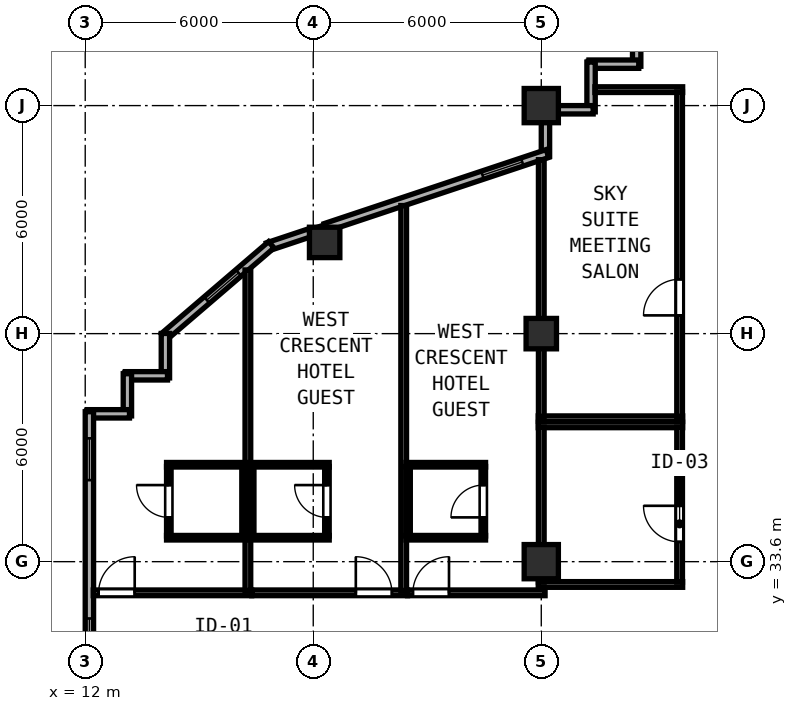
"""IFC4 building model, lengths in metres.
Left out: names, types, materials, properties, quantities, classifications, styles, units other than length and angle.
Written with IfcOpenShell. Run it as: python <this file> out.ifc"""

import sys

from ifc_helpers import new_model, si_unit, direction, frame, frame_2d, origin, origin_2d, place, context, subcontext, project, spatial, rectangle, hollow_rectangle, extrude, element, fill, save


model = new_model("IFC4")
c1 = context("Model", 3, precision=1e-05, world=origin(), true_north=direction((0.0, 1.0)))
c2 = subcontext(c1, "Body", "Model", "MODEL_VIEW")
j1 = project(units=[si_unit("LENGTHUNIT", "METRE"), si_unit("PLANEANGLEUNIT", "RADIAN")], contexts=[c1])
p1 = place(None, origin())
s1 = spatial("IfcSite", under=j1, at=p1, CompositionType="ELEMENT")
p2 = place(p1, origin())
s2 = spatial("IfcBuilding", under=s1, at=p2, CompositionType="ELEMENT")
p3 = place(p2, frame((0.0, 0.0, 223.0)))
s3 = spatial("IfcBuildingStorey", under=s2, at=p3, CompositionType="ELEMENT", Elevation=223.0)
for number, where, z_axis, x_axis in (
    (1, (24.0, 33.6, 0.0), (0.0, 0.0, 1.0), (1.0, 0.0, 0.0)),
    (2, (24.0, 45.6, 0.0), (0.0, 0.0, 1.0), (1.0, 0.0, 0.0)),
):
    element("IfcColumn", number, at=place(p3, frame(where, z_axis=z_axis, x_axis=x_axis)), inside=s3, PredefinedType="COLUMN", context=c2, shape_type="SweptSolid", body=[
        extrude(hollow_rectangle(XDim=0.9, YDim=0.9, WallThickness=0.034, at=origin_2d()), origin(), (0.0, 0.0, 1.0), 3.8),
    ])
for number, where, z_axis, x_axis in (
    (3, (24.0, 39.6, 0.0), (0.0, 0.0, 1.0), (1.0, 0.0, 0.0)),
    (4, (18.3, 42.0, 0.0), (0.0, 0.0, 1.0), (1.0, 0.0, 0.0)),
):
    element("IfcColumn", number, at=place(p3, frame(where, z_axis=z_axis, x_axis=x_axis)), inside=s3, PredefinedType="COLUMN", context=c2, shape_type="SweptSolid", body=[
        extrude(hollow_rectangle(XDim=0.8, YDim=0.8, WallThickness=0.03, at=origin_2d()), origin(), (0.0, 0.0, 1.0), 3.8),
    ])
p4 = place(p3, frame((26.51, 48.0, 0.0), z_axis=(0.0, 0.0, 1.0), x_axis=(0.0, -1.0, 0.0)))
e5 = element("IfcWall", 5, at=p4, inside=s3, PredefinedType="SOLIDWALL", context=c2, shape_type="SweptSolid", body=[
    extrude(rectangle(XDim=1.365, YDim=0.22, at=frame_2d((0.683, 0.0))), origin(), (0.0, 0.0, 1.0), 3.62),
])
for number, where, z_axis, x_axis in (
    (6, (26.565, 46.69, 0.0), (0.0, 0.0, 1.0), (-1.0, 0.0, 0.0)),
    (7, (25.31, 46.745, 0.0), (0.0, 0.0, 1.0), (0.0, -1.0, 0.0)),
):
    element("IfcWall", number, at=place(p3, frame(where, z_axis=z_axis, x_axis=x_axis)), inside=s3, PredefinedType="SOLIDWALL", context=c2, shape_type="SweptSolid", body=[
        extrude(rectangle(XDim=1.31, YDim=0.22, at=frame_2d((0.655, 0.0))), origin(), (0.0, 0.0, 1.0), 3.62),
    ])
p5 = place(p3, frame((25.365, 45.49, 0.0), z_axis=(0.0, 0.0, 1.0), x_axis=(-1.0, 0.0, 0.0)))
e8 = element("IfcWall", 8, at=p5, inside=s3, PredefinedType="SOLIDWALL", context=c2, shape_type="SweptSolid", body=[
    extrude(rectangle(XDim=0.923, YDim=0.22, at=frame_2d((0.461, 0.0))), origin(), (0.0, 0.0, 1.0), 3.62),
])
p6 = place(p3, frame((24.11, 45.158, 0.0), z_axis=(0.0, 0.0, 1.0), x_axis=(0.0, -1.0, 0.0)))
e9 = element("IfcWall", 9, at=p6, inside=s3, PredefinedType="SOLIDWALL", context=c2, shape_type="SweptSolid", body=[
    extrude(rectangle(XDim=0.892, YDim=0.22, at=frame_2d((0.446, 0.0))), origin(), (0.0, 0.0, 1.0), 3.215),
])
p7 = place(p3, frame((24.162, 44.338, 0.0), z_axis=(0.0, 0.0, 1.0), x_axis=(-0.948687265055, -0.316215864755, 0.0)))
e10 = element("IfcWall", 10, at=p7, inside=s3, PredefinedType="SOLIDWALL", context=c2, shape_type="SweptSolid", body=[
    extrude(rectangle(XDim=6.154, YDim=0.22, at=frame_2d((3.077, 0.0))), origin(), (0.0, 0.0, 1.0), 3.215),
])
p8 = place(p7, frame((0.7, 0.0, 0.85)))
e11 = element("IfcOpeningElement", 11, at=p8, cuts=e10, PredefinedType="OPENING", context=c2, shape_type="SweptSolid", body=[
    extrude(rectangle(XDim=1.1, YDim=1.75, at=frame_2d((0.55, 0.875))), frame((0.0, 0.12, 0.0), z_axis=(0.0, -1.0, 0.0), x_axis=(1.0, 0.0, 0.0)), (0.0, 0.0, 1.0), 0.24),
])
p9 = place(p3, frame((17.908, 42.253, 0.0), z_axis=(0.0, 0.0, 1.0), x_axis=(-0.948662335685, -0.316290646166, 0.0)))
e12 = element("IfcWall", 12, at=p9, inside=s3, PredefinedType="SOLIDWALL", context=c2, shape_type="SweptSolid", body=[
    extrude(rectangle(XDim=1.165, YDim=0.22, at=frame_2d((0.583, 0.0))), origin(), (0.0, 0.0, 1.0), 3.62),
])
p10 = place(p3, frame((16.897, 41.938, 0.0), z_axis=(0.0, 0.0, 1.0), x_axis=(-0.759279729622, -0.650764390686, 0.0)))
e13 = element("IfcWall", 13, at=p10, inside=s3, PredefinedType="SOLIDWALL", context=c2, shape_type="SweptSolid", body=[
    extrude(rectangle(XDim=3.726, YDim=0.22, at=frame_2d((1.863, 0.0))), origin(), (0.0, 0.0, 1.0), 3.62),
])
p11 = place(p10, frame((1.135, 0.0, 0.85)))
e14 = element("IfcOpeningElement", 14, at=p11, cuts=e13, PredefinedType="OPENING", context=c2, shape_type="SweptSolid", body=[
    extrude(rectangle(XDim=1.1, YDim=1.75, at=frame_2d((0.55, 0.875))), frame((0.0, 0.12, 0.0), z_axis=(0.0, -1.0, 0.0), x_axis=(1.0, 0.0, 0.0)), (0.0, 0.0, 1.0), 0.24),
])
p12 = place(p3, frame((14.11, 39.604, 0.0), z_axis=(0.0, 0.0, 1.0), x_axis=(0.0, -1.0, 0.0)))
e15 = element("IfcWall", 15, at=p12, inside=s3, PredefinedType="SOLIDWALL", context=c2, shape_type="SweptSolid", body=[
    extrude(rectangle(XDim=1.169, YDim=0.22, at=frame_2d((0.585, 0.0))), origin(), (0.0, 0.0, 1.0), 3.62),
])
p13 = place(p3, frame((14.165, 38.49, 0.0), z_axis=(0.0, 0.0, 1.0), x_axis=(-1.0, 0.0, 0.0)))
e16 = element("IfcWall", 16, at=p13, inside=s3, PredefinedType="SOLIDWALL", context=c2, shape_type="SweptSolid", body=[
    extrude(rectangle(XDim=1.11, YDim=0.22, at=frame_2d((0.555, 0.0))), origin(), (0.0, 0.0, 1.0), 3.62),
])
p14 = place(p3, frame((13.11, 38.545, 0.0), z_axis=(0.0, 0.0, 1.0), x_axis=(0.0, -1.0, 0.0)))
e17 = element("IfcWall", 17, at=p14, inside=s3, PredefinedType="SOLIDWALL", context=c2, shape_type="SweptSolid", body=[
    extrude(rectangle(XDim=1.11, YDim=0.22, at=frame_2d((0.555, 0.0))), origin(), (0.0, 0.0, 1.0), 3.62),
])
p15 = place(p3, frame((13.165, 37.49, 0.0), z_axis=(0.0, 0.0, 1.0), x_axis=(-1.0, 0.0, 0.0)))
e18 = element("IfcWall", 18, at=p15, inside=s3, PredefinedType="SOLIDWALL", context=c2, shape_type="SweptSolid", body=[
    extrude(rectangle(XDim=1.11, YDim=0.22, at=frame_2d((0.555, 0.0))), origin(), (0.0, 0.0, 1.0), 3.62),
])
p16 = place(p3, frame((12.11, 37.545, 0.0), z_axis=(0.0, 0.0, 1.0), x_axis=(0.0, -1.0, 0.0)))
e19 = element("IfcWall", 19, at=p16, inside=s3, PredefinedType="SOLIDWALL", context=c2, shape_type="SweptSolid", body=[
    extrude(rectangle(XDim=21.145, YDim=0.22, at=frame_2d((10.573, 0.0))), origin(), (0.0, 0.0, 1.0), 3.62),
])
p17 = place(p16, frame((0.7, 0.0, 0.85)))
e20 = element("IfcOpeningElement", 20, at=p17, cuts=e19, PredefinedType="OPENING", context=c2, shape_type="SweptSolid", body=[
    extrude(rectangle(XDim=1.1, YDim=1.75, at=frame_2d((0.55, 0.875))), frame((0.0, 0.12, 0.0), z_axis=(0.0, -1.0, 0.0), x_axis=(1.0, 0.0, 0.0)), (0.0, 0.0, 1.0), 0.24),
])
p18 = place(p16, frame((5.44, 0.0, 0.85)))
e21 = element("IfcOpeningElement", 21, at=p18, cuts=e19, PredefinedType="OPENING", context=c2, shape_type="SweptSolid", body=[
    extrude(rectangle(XDim=1.1, YDim=1.75, at=frame_2d((0.55, 0.875))), frame((0.0, 0.12, 0.0), z_axis=(0.0, -1.0, 0.0), x_axis=(1.0, 0.0, 0.0)), (0.0, 0.0, 1.0), 0.24),
])
p19 = place(p16, frame((11.5, 0.0, 0.85)))
e22 = element("IfcOpeningElement", 22, at=p19, cuts=e19, PredefinedType="OPENING", context=c2, shape_type="SweptSolid", body=[
    extrude(rectangle(XDim=1.1, YDim=1.75, at=frame_2d((0.55, 0.875))), frame((0.0, 0.12, 0.0), z_axis=(0.0, -1.0, 0.0), x_axis=(1.0, 0.0, 0.0)), (0.0, 0.0, 1.0), 0.24),
])
p20 = place(p16, frame((16.9, 0.0, 0.85)))
e23 = element("IfcOpeningElement", 23, at=p20, cuts=e19, PredefinedType="OPENING", context=c2, shape_type="SweptSolid", body=[
    extrude(rectangle(XDim=1.1, YDim=1.75, at=frame_2d((0.55, 0.875))), frame((0.0, 0.12, 0.0), z_axis=(0.0, -1.0, 0.0), x_axis=(1.0, 0.0, 0.0)), (0.0, 0.0, 1.0), 0.24),
])
for number, where, z_axis, x_axis in (
    (24, (23.92, 37.2, 0.0), (0.0, 0.0, 1.0), (1.0, 0.0, 0.0)),
    (25, (23.92, 33.0, 0.0), (0.0, 0.0, 1.0), (1.0, 0.0, 0.0)),
):
    element("IfcWall", number, at=place(p3, frame(where, z_axis=z_axis, x_axis=x_axis)), inside=s3, PredefinedType="PARTITIONING", context=c2, shape_type="SweptSolid", body=[
        extrude(rectangle(XDim=3.8, YDim=0.15, at=frame_2d((1.9, 0.0))), origin(), (0.0, 0.0, 1.0), 3.62),
    ])
p21 = place(p3, frame((24.0, 33.06, 0.0), z_axis=(0.0, 0.0, 1.0), x_axis=(0.0, 1.0, 0.0)))
e26 = element("IfcWall", 26, at=p21, inside=s3, PredefinedType="PARTITIONING", context=c2, shape_type="SweptSolid", body=[
    extrude(rectangle(XDim=4.08, YDim=0.15, at=frame_2d((2.04, 0.0))), origin(), (0.0, 0.0, 1.0), 3.215),
])
p22 = place(p3, frame((27.64, 33.06, 0.0), z_axis=(0.0, 0.0, 1.0), x_axis=(0.0, 1.0, 0.0)))
e27 = element("IfcWall", 27, at=p22, inside=s3, PredefinedType="PARTITIONING", context=c2, shape_type="SweptSolid", body=[
    extrude(rectangle(XDim=4.08, YDim=0.15, at=frame_2d((2.04, 0.0))), origin(), (0.0, 0.0, 1.0), 3.62),
])
p23 = place(p22, frame((2.01, 0.0, 0.0), z_axis=(0.0, 0.0, 1.0), x_axis=(-1.0, 0.0, 0.0)))
e28 = element("IfcOpeningElement", 28, at=p23, cuts=e27, PredefinedType="OPENING", context=c2, shape_type="SweptSolid", body=[
    extrude(rectangle(XDim=0.95, YDim=2.12, at=frame_2d((0.475, 1.06))), frame((0.0, 0.085, 0.0), z_axis=(0.0, -1.0, 0.0), x_axis=(1.0, 0.0, 0.0)), (0.0, 0.0, 1.0), 0.17),
])
p24 = place(p3, frame((25.412, 46.02, 0.0), z_axis=(0.0, 0.0, 1.0), x_axis=(1.0, 0.0, 0.0)))
e29 = element("IfcWall", 29, at=p24, inside=s3, PredefinedType="PARTITIONING", context=c2, shape_type="SweptSolid", body=[
    extrude(rectangle(XDim=2.308, YDim=0.15, at=frame_2d((1.154, 0.0))), origin(), (0.0, 0.0, 1.0), 3.62),
])
p25 = place(p3, frame((23.92, 37.36, 0.0), z_axis=(0.0, 0.0, 1.0), x_axis=(1.0, 0.0, 0.0)))
e30 = element("IfcWall", 30, at=p25, inside=s3, PredefinedType="PARTITIONING", context=c2, shape_type="SweptSolid", body=[
    extrude(rectangle(XDim=3.8, YDim=0.15, at=frame_2d((1.9, 0.0))), origin(), (0.0, 0.0, 1.0), 3.62),
])
p26 = place(p3, frame((24.0, 37.42, 0.0), z_axis=(0.0, 0.0, 1.0), x_axis=(0.0, 1.0, 0.0)))
e31 = element("IfcWall", 31, at=p26, inside=s3, PredefinedType="PARTITIONING", context=c2, shape_type="SweptSolid", body=[
    extrude(rectangle(XDim=6.757, YDim=0.15, at=frame_2d((3.378, 0.0))), origin(), (0.0, 0.0, 1.0), 3.215),
])
p27 = place(p3, frame((27.64, 37.42, 0.0), z_axis=(0.0, 0.0, 1.0), x_axis=(0.0, 1.0, 0.0)))
e32 = element("IfcWall", 32, at=p27, inside=s3, PredefinedType="PARTITIONING", context=c2, shape_type="SweptSolid", body=[
    extrude(rectangle(XDim=8.54, YDim=0.15, at=frame_2d((4.27, 0.0))), origin(), (0.0, 0.0, 1.0), 3.62),
])
p28 = place(p27, frame((3.61, 0.0, 0.0), z_axis=(0.0, 0.0, 1.0), x_axis=(-1.0, 0.0, 0.0)))
e33 = element("IfcOpeningElement", 33, at=p28, cuts=e32, PredefinedType="OPENING", context=c2, shape_type="SweptSolid", body=[
    extrude(rectangle(XDim=0.95, YDim=2.12, at=frame_2d((0.475, 1.06))), frame((0.0, 0.085, 0.0), z_axis=(0.0, -1.0, 0.0), x_axis=(1.0, 0.0, 0.0)), (0.0, 0.0, 1.0), 0.17),
])
p29 = place(p3, frame((12.212, 32.78, 0.0), z_axis=(0.0, 0.0, 1.0), x_axis=(1.0, 0.0, 0.0)))
e34 = element("IfcWall", 34, at=p29, inside=s3, PredefinedType="PARTITIONING", context=c2, shape_type="SweptSolid", body=[
    extrude(rectangle(XDim=4.168, YDim=0.15, at=frame_2d((2.084, 0.0))), origin(), (0.0, 0.0, 1.0), 3.62),
])
p30 = place(p29, frame((0.14, 0.0, 0.0)))
e35 = element("IfcOpeningElement", 35, at=p30, cuts=e34, PredefinedType="OPENING", context=c2, shape_type="SweptSolid", body=[
    extrude(rectangle(XDim=0.95, YDim=2.15, at=frame_2d((0.475, 1.075))), frame((0.0, 0.085, 0.0), z_axis=(0.0, -1.0, 0.0), x_axis=(1.0, 0.0, 0.0)), (0.0, 0.0, 1.0), 0.17),
])
p31 = place(p3, frame((16.28, 32.84, 0.0), z_axis=(0.0, 0.0, 1.0), x_axis=(0.0, 1.0, 0.0)))
e36 = element("IfcWall", 36, at=p31, inside=s3, PredefinedType="PARTITIONING", context=c2, shape_type="SweptSolid", body=[
    extrude(rectangle(XDim=8.435, YDim=0.15, at=frame_2d((4.218, 0.0))), origin(), (0.0, 0.0, 1.0), 3.62),
])
for number, where, z_axis, x_axis in (
    (37, (14.14, 36.15, 0.0), (0.0, 0.0, 1.0), (1.0, 0.0, 0.0)),
    (38, (14.14, 34.23, 0.0), (0.0, 0.0, 1.0), (1.0, 0.0, 0.0)),
):
    element("IfcWall", number, at=place(p3, frame(where, z_axis=z_axis, x_axis=x_axis)), inside=s3, PredefinedType="PARTITIONING", context=c2, shape_type="SweptSolid", body=[
        extrude(rectangle(XDim=2.08, YDim=0.12, at=frame_2d((1.04, 0.0))), origin(), (0.0, 0.0, 1.0), 3.62),
    ])
p32 = place(p3, frame((14.2, 34.275, 0.0), z_axis=(0.0, 0.0, 1.0), x_axis=(0.0, 1.0, 0.0)))
e39 = element("IfcWall", 39, at=p32, inside=s3, PredefinedType="PARTITIONING", context=c2, shape_type="SweptSolid", body=[
    extrude(rectangle(XDim=1.83, YDim=0.12, at=frame_2d((0.915, 0.0))), origin(), (0.0, 0.0, 1.0), 3.62),
])
p33 = place(p32, frame((1.34, 0.0, 0.0), z_axis=(0.0, 0.0, 1.0), x_axis=(-1.0, 0.0, 0.0)))
e40 = element("IfcOpeningElement", 40, at=p33, cuts=e39, PredefinedType="OPENING", context=c2, shape_type="SweptSolid", body=[
    extrude(rectangle(XDim=0.85, YDim=2.1, at=frame_2d((0.425, 1.05))), frame((0.0, 0.07, 0.0), z_axis=(0.0, -1.0, 0.0), x_axis=(1.0, 0.0, 0.0)), (0.0, 0.0, 1.0), 0.14),
])
p34 = place(p3, frame((16.18, 34.275, 0.0), z_axis=(0.0, 0.0, 1.0), x_axis=(0.0, 1.0, 0.0)))
e41 = element("IfcWall", 41, at=p34, inside=s3, PredefinedType="PARTITIONING", context=c2, shape_type="SweptSolid", body=[
    extrude(rectangle(XDim=1.83, YDim=0.12, at=frame_2d((0.915, 0.0))), origin(), (0.0, 0.0, 1.0), 3.62),
])
p35 = place(p3, frame((16.382, 32.78, 0.0), z_axis=(0.0, 0.0, 1.0), x_axis=(1.0, 0.0, 0.0)))
e42 = element("IfcWall", 42, at=p35, inside=s3, PredefinedType="PARTITIONING", context=c2, shape_type="SweptSolid", body=[
    extrude(rectangle(XDim=4.098, YDim=0.15, at=frame_2d((2.049, 0.0))), origin(), (0.0, 0.0, 1.0), 3.62),
])
p36 = place(p35, frame((2.738, 0.0, 0.0)))
e43 = element("IfcOpeningElement", 43, at=p36, cuts=e42, PredefinedType="OPENING", context=c2, shape_type="SweptSolid", body=[
    extrude(rectangle(XDim=0.95, YDim=2.15, at=frame_2d((0.475, 1.075))), frame((0.0, 0.085, 0.0), z_axis=(0.0, -1.0, 0.0), x_axis=(1.0, 0.0, 0.0)), (0.0, 0.0, 1.0), 0.17),
])
p37 = place(p3, frame((20.38, 32.84, 0.0), z_axis=(0.0, 0.0, 1.0), x_axis=(0.0, 1.0, 0.0)))
e44 = element("IfcWall", 44, at=p37, inside=s3, PredefinedType="PARTITIONING", context=c2, shape_type="SweptSolid", body=[
    extrude(rectangle(XDim=10.13, YDim=0.15, at=frame_2d((5.065, 0.0))), origin(), (0.0, 0.0, 1.0), 3.62),
])
for number, where, z_axis, x_axis in (
    (45, (16.34, 36.15, 0.0), (0.0, 0.0, 1.0), (1.0, 0.0, 0.0)),
    (46, (16.34, 34.23, 0.0), (0.0, 0.0, 1.0), (1.0, 0.0, 0.0)),
):
    element("IfcWall", number, at=place(p3, frame(where, z_axis=z_axis, x_axis=x_axis)), inside=s3, PredefinedType="PARTITIONING", context=c2, shape_type="SweptSolid", body=[
        extrude(rectangle(XDim=2.08, YDim=0.12, at=frame_2d((1.04, 0.0))), origin(), (0.0, 0.0, 1.0), 3.62),
    ])
p38 = place(p3, frame((16.38, 34.275, 0.0), z_axis=(0.0, 0.0, 1.0), x_axis=(0.0, 1.0, 0.0)))
e47 = element("IfcWall", 47, at=p38, inside=s3, PredefinedType="PARTITIONING", context=c2, shape_type="SweptSolid", body=[
    extrude(rectangle(XDim=1.83, YDim=0.12, at=frame_2d((0.915, 0.0))), origin(), (0.0, 0.0, 1.0), 3.62),
])
p39 = place(p3, frame((18.36, 34.275, 0.0), z_axis=(0.0, 0.0, 1.0), x_axis=(0.0, 1.0, 0.0)))
e48 = element("IfcWall", 48, at=p39, inside=s3, PredefinedType="PARTITIONING", context=c2, shape_type="SweptSolid", body=[
    extrude(rectangle(XDim=1.83, YDim=0.12, at=frame_2d((0.915, 0.0))), origin(), (0.0, 0.0, 1.0), 3.62),
])
p40 = place(p39, frame((0.49, 0.0, 0.0)))
e49 = element("IfcOpeningElement", 49, at=p40, cuts=e48, PredefinedType="OPENING", context=c2, shape_type="SweptSolid", body=[
    extrude(rectangle(XDim=0.85, YDim=2.1, at=frame_2d((0.425, 1.05))), frame((0.0, 0.07, 0.0), z_axis=(0.0, -1.0, 0.0), x_axis=(1.0, 0.0, 0.0)), (0.0, 0.0, 1.0), 0.14),
])
p41 = place(p3, frame((20.482, 32.78, 0.0), z_axis=(0.0, 0.0, 1.0), x_axis=(1.0, 0.0, 0.0)))
e50 = element("IfcWall", 50, at=p41, inside=s3, PredefinedType="PARTITIONING", context=c2, shape_type="SweptSolid", body=[
    extrude(rectangle(XDim=3.618, YDim=0.15, at=frame_2d((1.809, 0.0))), origin(), (0.0, 0.0, 1.0), 3.62),
])
p42 = place(p41, frame((0.14, 0.0, 0.0)))
e51 = element("IfcOpeningElement", 51, at=p42, cuts=e50, PredefinedType="OPENING", context=c2, shape_type="SweptSolid", body=[
    extrude(rectangle(XDim=0.95, YDim=2.15, at=frame_2d((0.475, 1.075))), frame((0.0, 0.085, 0.0), z_axis=(0.0, -1.0, 0.0), x_axis=(1.0, 0.0, 0.0)), (0.0, 0.0, 1.0), 0.17),
])
for number, where, z_axis, x_axis in (
    (52, (20.44, 36.15, 0.0), (0.0, 0.0, 1.0), (1.0, 0.0, 0.0)),
    (53, (20.44, 34.23, 0.0), (0.0, 0.0, 1.0), (1.0, 0.0, 0.0)),
):
    element("IfcWall", number, at=place(p3, frame(where, z_axis=z_axis, x_axis=x_axis)), inside=s3, PredefinedType="PARTITIONING", context=c2, shape_type="SweptSolid", body=[
        extrude(rectangle(XDim=2.094, YDim=0.12, at=frame_2d((1.047, 0.0))), origin(), (0.0, 0.0, 1.0), 3.62),
    ])
p43 = place(p3, frame((20.494, 34.275, 0.0), z_axis=(0.0, 0.0, 1.0), x_axis=(0.0, 1.0, 0.0)))
e54 = element("IfcWall", 54, at=p43, inside=s3, PredefinedType="PARTITIONING", context=c2, shape_type="SweptSolid", body=[
    extrude(rectangle(XDim=1.83, YDim=0.12, at=frame_2d((0.915, 0.0))), origin(), (0.0, 0.0, 1.0), 3.62),
])
p44 = place(p3, frame((22.474, 34.275, 0.0), z_axis=(0.0, 0.0, 1.0), x_axis=(0.0, 1.0, 0.0)))
e55 = element("IfcWall", 55, at=p44, inside=s3, PredefinedType="PARTITIONING", context=c2, shape_type="SweptSolid", body=[
    extrude(rectangle(XDim=1.83, YDim=0.12, at=frame_2d((0.915, 0.0))), origin(), (0.0, 0.0, 1.0), 3.62),
])
p45 = place(p44, frame((0.49, 0.0, 0.0)))
e56 = element("IfcOpeningElement", 56, at=p45, cuts=e55, PredefinedType="OPENING", context=c2, shape_type="SweptSolid", body=[
    extrude(rectangle(XDim=0.85, YDim=2.1, at=frame_2d((0.425, 1.05))), frame((0.0, 0.07, 0.0), z_axis=(0.0, -1.0, 0.0), x_axis=(1.0, 0.0, 0.0)), (0.0, 0.0, 1.0), 0.14),
])
p46 = place(p8, origin())
e57 = element("IfcWindow", 57, at=p46, inside=s3, PartitioningType="SINGLE_PANEL", PredefinedType="WINDOW", context=c2, shape_type="SweptSolid", body=[
    extrude(rectangle(XDim=1.1, YDim=1.75, at=frame_2d((0.55, 0.875))), frame((0.0, 0.03, 0.0), z_axis=(0.0, -1.0, 0.0), x_axis=(1.0, 0.0, 0.0)), (0.0, 0.0, 1.0), 0.06),
])
fill(e11, e57)
p47 = place(p11, origin())
e58 = element("IfcWindow", 58, at=p47, inside=s3, PartitioningType="SINGLE_PANEL", PredefinedType="WINDOW", context=c2, shape_type="SweptSolid", body=[
    extrude(rectangle(XDim=1.1, YDim=1.75, at=frame_2d((0.55, 0.875))), frame((0.0, 0.03, 0.0), z_axis=(0.0, -1.0, 0.0), x_axis=(1.0, 0.0, 0.0)), (0.0, 0.0, 1.0), 0.06),
])
fill(e14, e58)
p48 = place(p17, origin())
e59 = element("IfcWindow", 59, at=p48, inside=s3, PartitioningType="SINGLE_PANEL", PredefinedType="WINDOW", context=c2, shape_type="SweptSolid", body=[
    extrude(rectangle(XDim=1.1, YDim=1.75, at=frame_2d((0.55, 0.875))), frame((0.0, 0.03, 0.0), z_axis=(0.0, -1.0, 0.0), x_axis=(1.0, 0.0, 0.0)), (0.0, 0.0, 1.0), 0.06),
])
fill(e20, e59)
p49 = place(p18, origin())
e60 = element("IfcWindow", 60, at=p49, inside=s3, PartitioningType="SINGLE_PANEL", PredefinedType="WINDOW", context=c2, shape_type="SweptSolid", body=[
    extrude(rectangle(XDim=1.1, YDim=1.75, at=frame_2d((0.55, 0.875))), frame((0.0, 0.03, 0.0), z_axis=(0.0, -1.0, 0.0), x_axis=(1.0, 0.0, 0.0)), (0.0, 0.0, 1.0), 0.06),
])
fill(e21, e60)
p50 = place(p23, origin())
e61 = element("IfcDoor", 61, at=p50, inside=s3, OperationType="SINGLE_SWING_LEFT", PredefinedType="DOOR", context=c2, shape_type="SweptSolid", body=[
    extrude(rectangle(XDim=0.95, YDim=2.12, at=frame_2d((0.475, 1.06))), frame((0.0, 0.025, 0.0), z_axis=(0.0, -1.0, 0.0), x_axis=(1.0, 0.0, 0.0)), (0.0, 0.0, 1.0), 0.05),
])
fill(e28, e61)
p51 = place(p28, origin())
e62 = element("IfcDoor", 62, at=p51, inside=s3, OperationType="SINGLE_SWING_RIGHT", PredefinedType="DOOR", context=c2, shape_type="SweptSolid", body=[
    extrude(rectangle(XDim=0.95, YDim=2.12, at=frame_2d((0.475, 1.06))), frame((0.0, 0.025, 0.0), z_axis=(0.0, -1.0, 0.0), x_axis=(1.0, 0.0, 0.0)), (0.0, 0.0, 1.0), 0.05),
])
fill(e33, e62)
p52 = place(p30, origin())
e63 = element("IfcDoor", 63, at=p52, inside=s3, OperationType="SINGLE_SWING_RIGHT", PredefinedType="DOOR", context=c2, shape_type="SweptSolid", body=[
    extrude(rectangle(XDim=0.95, YDim=2.15, at=frame_2d((0.475, 1.075))), frame((0.0, 0.025, 0.0), z_axis=(0.0, -1.0, 0.0), x_axis=(1.0, 0.0, 0.0)), (0.0, 0.0, 1.0), 0.05),
])
fill(e35, e63)
p53 = place(p33, origin())
e64 = element("IfcDoor", 64, at=p53, inside=s3, OperationType="SINGLE_SWING_LEFT", PredefinedType="DOOR", context=c2, shape_type="SweptSolid", body=[
    extrude(rectangle(XDim=0.85, YDim=2.1, at=frame_2d((0.425, 1.05))), frame((0.0, 0.025, 0.0), z_axis=(0.0, -1.0, 0.0), x_axis=(1.0, 0.0, 0.0)), (0.0, 0.0, 1.0), 0.05),
])
fill(e40, e64)
p54 = place(p36, origin())
e65 = element("IfcDoor", 65, at=p54, inside=s3, OperationType="SINGLE_SWING_LEFT", PredefinedType="DOOR", context=c2, shape_type="SweptSolid", body=[
    extrude(rectangle(XDim=0.95, YDim=2.15, at=frame_2d((0.475, 1.075))), frame((0.0, 0.025, 0.0), z_axis=(0.0, -1.0, 0.0), x_axis=(1.0, 0.0, 0.0)), (0.0, 0.0, 1.0), 0.05),
])
fill(e43, e65)
p55 = place(p40, origin())
e66 = element("IfcDoor", 66, at=p55, inside=s3, OperationType="SINGLE_SWING_RIGHT", PredefinedType="DOOR", context=c2, shape_type="SweptSolid", body=[
    extrude(rectangle(XDim=0.85, YDim=2.1, at=frame_2d((0.425, 1.05))), frame((0.0, 0.025, 0.0), z_axis=(0.0, -1.0, 0.0), x_axis=(1.0, 0.0, 0.0)), (0.0, 0.0, 1.0), 0.05),
])
fill(e49, e66)
p56 = place(p42, origin())
e67 = element("IfcDoor", 67, at=p56, inside=s3, OperationType="SINGLE_SWING_RIGHT", PredefinedType="DOOR", context=c2, shape_type="SweptSolid", body=[
    extrude(rectangle(XDim=0.95, YDim=2.15, at=frame_2d((0.475, 1.075))), frame((0.0, 0.025, 0.0), z_axis=(0.0, -1.0, 0.0), x_axis=(1.0, 0.0, 0.0)), (0.0, 0.0, 1.0), 0.05),
])
fill(e51, e67)
p57 = place(p45, origin())
e68 = element("IfcDoor", 68, at=p57, inside=s3, OperationType="SINGLE_SWING_LEFT", PredefinedType="DOOR", context=c2, shape_type="SweptSolid", body=[
    extrude(rectangle(XDim=0.85, YDim=2.1, at=frame_2d((0.425, 1.05))), frame((0.0, 0.025, 0.0), z_axis=(0.0, -1.0, 0.0), x_axis=(1.0, 0.0, 0.0)), (0.0, 0.0, 1.0), 0.05),
])
fill(e56, e68)
save(model, sys.argv[1])
